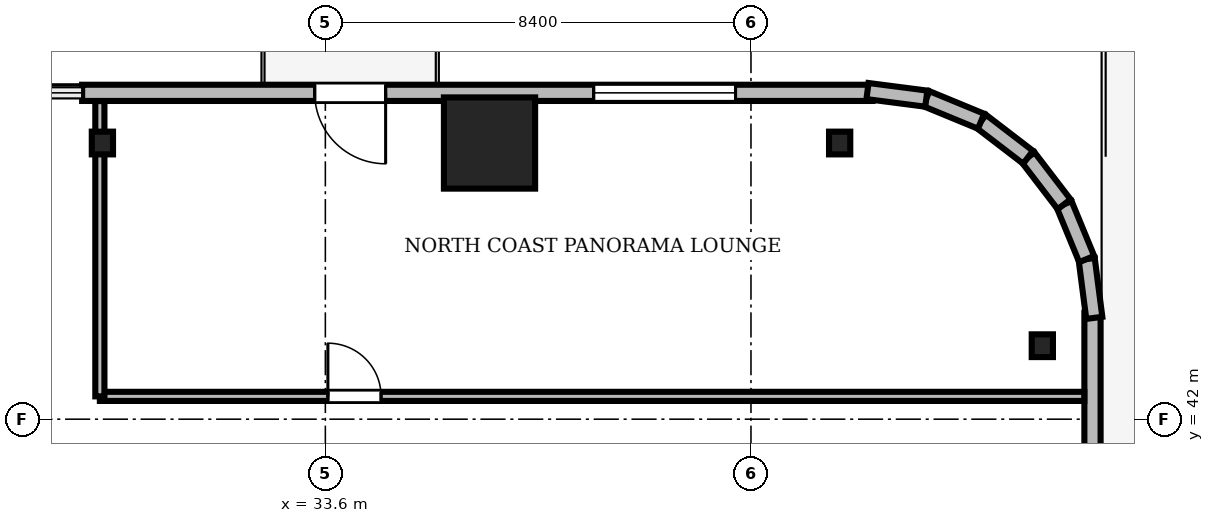
"""IFC4 building model, lengths in metres.
Left out: names, types, materials, properties, quantities, classifications, styles, units other than length and angle.
Written with IfcOpenShell. Run it as: python <this file> out.ifc"""

import sys

from ifc_helpers import new_model, si_unit, direction, frame, frame_2d, origin, origin_2d, place, context, subcontext, project, spatial, rectangle, i_section, extrude, source, transform, mapped, element, fill, save


model = new_model("IFC4")
c1 = context("Model", 3, precision=1e-05, world=origin(), true_north=direction((0.0, 1.0)))
c2 = subcontext(c1, "Body", "Model", "MODEL_VIEW")
j1 = project(units=[si_unit("LENGTHUNIT", "METRE"), si_unit("PLANEANGLEUNIT", "RADIAN")], contexts=[c1])
p1 = place(None, origin())
s1 = spatial("IfcSite", under=j1, at=p1, CompositionType="ELEMENT")
p2 = place(p1, origin())
s2 = spatial("IfcBuilding", under=s1, at=p2, CompositionType="ELEMENT")
p3 = place(p2, frame((0.0, 0.0, 27.6)))
s3 = spatial("IfcBuildingStorey", under=s2, at=p3, CompositionType="ELEMENT", Elevation=27.6)
m1 = source(origin(), c2, "Body", "SweptSolid", [
    extrude(rectangle(XDim=1.8, YDim=1.8, at=origin_2d()), origin(), (0.0, 0.0, 1.0), 3.41),
])
p4 = place(p3, frame((36.84, 47.45, 0.0), z_axis=(0.0, 0.0, 1.0), x_axis=(1.0, 0.0, 0.0)))
e1 = element("IfcColumn", 1, at=p4, inside=s3, PredefinedType="COLUMN", context=c2, shape_type="MappedRepresentation", body=[
    mapped(m1, transform((0.0, 0.0, 0.0), scale=1.0)),
])
m2 = source(origin(), c2, "Body", "SweptSolid", [
    extrude(i_section(OverallWidth=0.419, OverallDepth=0.449, WebThickness=0.031, FlangeThickness=0.048, FilletRadius=0.015, at=origin_2d()), origin(), (0.0, 0.0, 1.0), 3.41),
])
for number, where, z_axis, x_axis in (
    (2, (47.75, 43.45, 0.0), (0.0, 0.0, 1.0), (1.0, 0.0, 0.0)),
    (3, (43.75, 47.45, 0.0), (0.0, 0.0, 1.0), (1.0, 0.0, 0.0)),
    (4, (29.2, 47.45, 0.0), (0.0, 0.0, 1.0), (1.0, 0.0, 0.0)),
):
    element("IfcColumn", number, at=place(p3, frame(where, z_axis=z_axis, x_axis=x_axis)), inside=s3, PredefinedType="COLUMN", context=c2, shape_type="MappedRepresentation", body=[
        mapped(m2, transform((0.0, 0.0, 0.0), scale=1.0)),
    ])
m3 = source(origin(), c2, "Body", "SweptSolid", [
    extrude(rectangle(XDim=15.6, YDim=0.32, at=frame_2d((7.8, 0.0))), origin(), (0.0, 0.0, 1.0), 3.41),
])
p5 = place(p3, frame((44.4, 48.44, 0.0), z_axis=(0.0, 0.0, 1.0), x_axis=(-1.0, 0.0, 0.0)))
e5 = element("IfcWall", 5, at=p5, inside=s3, PredefinedType="SOLIDWALL", context=c2, shape_type="MappedRepresentation", body=[
    mapped(m3, transform((0.0, 0.0, 0.0), scale=1.0)),
])
m4 = source(origin(), c2, "Body", "SweptSolid", [
    extrude(rectangle(XDim=1.4, YDim=2.3, at=frame_2d((0.7, 1.15))), frame((0.0, 0.17, 0.0), z_axis=(0.0, -1.0, 0.0), x_axis=(1.0, 0.0, 0.0)), (0.0, 0.0, 1.0), 0.34),
])
p6 = place(p5, frame((9.61, 0.0, 0.0)))
e6 = element("IfcOpeningElement", 6, at=p6, cuts=e5, PredefinedType="OPENING", context=c2, shape_type="MappedRepresentation", body=[
    mapped(m4, transform((0.0, 0.0, 0.0), scale=1.0)),
])
m5 = source(origin(), c2, "Body", "SweptSolid", [
    extrude(rectangle(XDim=2.8, YDim=2.4, at=frame_2d((1.4, 1.2))), frame((0.0, 0.17, 0.0), z_axis=(0.0, -1.0, 0.0), x_axis=(1.0, 0.0, 0.0)), (0.0, 0.0, 1.0), 0.34),
])
p7 = place(p5, frame((2.705, 0.0, 0.72)))
e7 = element("IfcOpeningElement", 7, at=p7, cuts=e5, PredefinedType="OPENING", context=c2, shape_type="MappedRepresentation", body=[
    mapped(m5, transform((0.0, 0.0, 0.0), scale=1.0)),
])
m6 = source(origin(), c2, "Body", "SweptSolid", [
    extrude(rectangle(XDim=15.6, YDim=0.32, at=frame_2d((7.8, 0.0))), origin(), (0.0, 0.0, 1.0), 3.41),
])
p8 = place(p3, frame((48.74, 28.5, 0.0), z_axis=(0.0, 0.0, 1.0), x_axis=(0.0, 1.0, 0.0)))
e8 = element("IfcWall", 8, at=p8, inside=s3, PredefinedType="SOLIDWALL", context=c2, shape_type="MappedRepresentation", body=[
    mapped(m6, transform((0.0, 0.0, 0.0), scale=1.0)),
])
p9 = place(p8, frame((10.095, 0.0, 0.72)))
e9 = element("IfcOpeningElement", 9, at=p9, cuts=e8, PredefinedType="OPENING", context=c2, shape_type="MappedRepresentation", body=[
    mapped(m5, transform((0.0, 0.0, 0.0), scale=1.0)),
])
m7 = source(origin(), c2, "Body", "SweptSolid", [
    extrude(rectangle(XDim=1.17, YDim=0.32, at=frame_2d((0.585, 0.0))), origin(), (0.0, 0.0, 1.0), 3.41),
])
p10 = place(p3, frame((48.776, 44.0, 0.0), z_axis=(0.0, 0.0, 1.0), x_axis=(-0.128295670475, 0.991735963317, 0.0)))
e10 = element("IfcWall", 10, at=p10, inside=s3, PredefinedType="SOLIDWALL", context=c2, shape_type="MappedRepresentation", body=[
    mapped(m7, transform((0.0, 0.0, 0.0), scale=1.0)),
])
m8 = source(origin(), c2, "Body", "SweptSolid", [
    extrude(rectangle(XDim=1.169, YDim=0.32, at=frame_2d((0.584, 0.0))), origin(), (0.0, 0.0, 1.0), 3.41),
])
p11 = place(p3, frame((48.625, 45.16, 0.0), z_axis=(0.0, 0.0, 1.0), x_axis=(-0.381054331552, 0.924552646638, 0.0)))
e11 = element("IfcWall", 11, at=p11, inside=s3, PredefinedType="SOLIDWALL", context=c2, shape_type="MappedRepresentation", body=[
    mapped(m8, transform((0.0, 0.0, 0.0), scale=1.0)),
])
m9 = source(origin(), c2, "Body", "SweptSolid", [
    extrude(rectangle(XDim=1.169, YDim=0.32, at=frame_2d((0.584, 0.0))), origin(), (0.0, 0.0, 1.0), 3.41),
])
p12 = place(p3, frame((48.18, 46.241, 0.0), z_axis=(0.0, 0.0, 1.0), x_axis=(-0.608387696831, 0.793639975269, 0.0)))
e12 = element("IfcWall", 12, at=p12, inside=s3, PredefinedType="SOLIDWALL", context=c2, shape_type="MappedRepresentation", body=[
    mapped(m9, transform((0.0, 0.0, 0.0), scale=1.0)),
])
m10 = source(origin(), c2, "Body", "SweptSolid", [
    extrude(rectangle(XDim=1.169, YDim=0.32, at=frame_2d((0.584, 0.0))), origin(), (0.0, 0.0, 1.0), 3.41),
])
p13 = place(p3, frame((47.469, 47.169, 0.0), z_axis=(0.0, 0.0, 1.0), x_axis=(-0.793663520347, 0.608356981114, 0.0)))
e13 = element("IfcWall", 13, at=p13, inside=s3, PredefinedType="SOLIDWALL", context=c2, shape_type="MappedRepresentation", body=[
    mapped(m10, transform((0.0, 0.0, 0.0), scale=1.0)),
])
p14 = place(p3, frame((46.541, 47.88, 0.0), z_axis=(0.0, 0.0, 1.0), x_axis=(-0.924552646638, 0.381054331552, 0.0)))
e14 = element("IfcWall", 14, at=p14, inside=s3, PredefinedType="SOLIDWALL", context=c2, shape_type="MappedRepresentation", body=[
    mapped(m8, transform((0.0, 0.0, 0.0), scale=1.0)),
])
p15 = place(p3, frame((45.46, 48.325, 0.0), z_axis=(0.0, 0.0, 1.0), x_axis=(-0.991735963317, 0.128295670475, 0.0)))
e15 = element("IfcWall", 15, at=p15, inside=s3, PredefinedType="SOLIDWALL", context=c2, shape_type="MappedRepresentation", body=[
    mapped(m7, transform((0.0, 0.0, 0.0), scale=1.0)),
])
m11 = source(origin(), c2, "Body", "SweptSolid", [
    extrude(rectangle(XDim=19.428, YDim=0.18, at=frame_2d((9.714, 0.0))), origin(), (0.0, 0.0, 1.0), 2.652),
])
p16 = place(p3, frame((29.15, 42.45, 0.0), z_axis=(0.0, 0.0, 1.0), x_axis=(1.0, 0.0, 0.0)))
e16 = element("IfcWall", 16, at=p16, inside=s3, PredefinedType="PARTITIONING", context=c2, shape_type="MappedRepresentation", body=[
    mapped(m11, transform((0.0, 0.0, 0.0), scale=1.0)),
])
m12 = source(origin(), c2, "Body", "SweptSolid", [
    extrude(rectangle(XDim=1.05, YDim=2.2, at=frame_2d((0.525, 1.1))), frame((0.0, 0.1, 0.0), z_axis=(0.0, -1.0, 0.0), x_axis=(1.0, 0.0, 0.0)), (0.0, 0.0, 1.0), 0.2),
])
p17 = place(p16, frame((4.5, 0.0, 0.0)))
e17 = element("IfcOpeningElement", 17, at=p17, cuts=e16, PredefinedType="OPENING", context=c2, shape_type="MappedRepresentation", body=[
    mapped(m12, transform((0.0, 0.0, 0.0), scale=1.0)),
])
m13 = source(origin(), c2, "Body", "SweptSolid", [
    extrude(rectangle(XDim=5.828, YDim=0.18, at=frame_2d((2.914, 0.0))), origin(), (0.0, 0.0, 1.0), 2.652),
])
p18 = place(p3, frame((29.15, 42.45, 0.0), z_axis=(0.0, 0.0, 1.0), x_axis=(0.0, 1.0, 0.0)))
e18 = element("IfcWall", 18, at=p18, inside=s3, PredefinedType="PARTITIONING", context=c2, shape_type="MappedRepresentation", body=[
    mapped(m13, transform((0.0, 0.0, 0.0), scale=1.0)),
])
m14 = source(origin(), c2, "Body", "SweptSolid", [
    extrude(rectangle(XDim=1.4, YDim=2.3, at=frame_2d((0.7, 1.15))), frame((0.0, 0.025, 0.0), z_axis=(0.0, -1.0, 0.0), x_axis=(1.0, 0.0, 0.0)), (0.0, 0.0, 1.0), 0.05),
])
p19 = place(p6, frame((1.4, 0.0, 0.0), z_axis=(0.0, 0.0, 1.0), x_axis=(-1.0, 0.0, 0.0)))
e19 = element("IfcDoor", 19, at=p19, inside=s3, OperationType="DOUBLE_DOOR_SLIDING", PredefinedType="DOOR", context=c2, shape_type="MappedRepresentation", body=[
    mapped(m14, transform((0.0, 0.0, 0.0), scale=1.0)),
])
fill(e6, e19)
m15 = source(origin(), c2, "Body", "SweptSolid", [
    extrude(rectangle(XDim=2.8, YDim=2.4, at=frame_2d((1.4, 1.2))), frame((0.0, 0.03, 0.0), z_axis=(0.0, -1.0, 0.0), x_axis=(1.0, 0.0, 0.0)), (0.0, 0.0, 1.0), 0.06),
])
p20 = place(p7, origin())
e20 = element("IfcWindow", 20, at=p20, inside=s3, PartitioningType="SINGLE_PANEL", PredefinedType="WINDOW", context=c2, shape_type="MappedRepresentation", body=[
    mapped(m15, transform((0.0, 0.0, 0.0), scale=1.0)),
])
fill(e7, e20)
m16 = source(origin(), c2, "Body", "SweptSolid", [
    extrude(rectangle(XDim=1.05, YDim=2.2, at=frame_2d((0.525, 1.1))), frame((0.0, 0.025, 0.0), z_axis=(0.0, -1.0, 0.0), x_axis=(1.0, 0.0, 0.0)), (0.0, 0.0, 1.0), 0.05),
])
p21 = place(p17, origin())
e21 = element("IfcDoor", 21, at=p21, inside=s3, OperationType="SINGLE_SWING_LEFT", PredefinedType="DOOR", context=c2, shape_type="MappedRepresentation", body=[
    mapped(m16, transform((0.0, 0.0, 0.0), scale=1.0)),
])
fill(e17, e21)
save(model, sys.argv[1])
